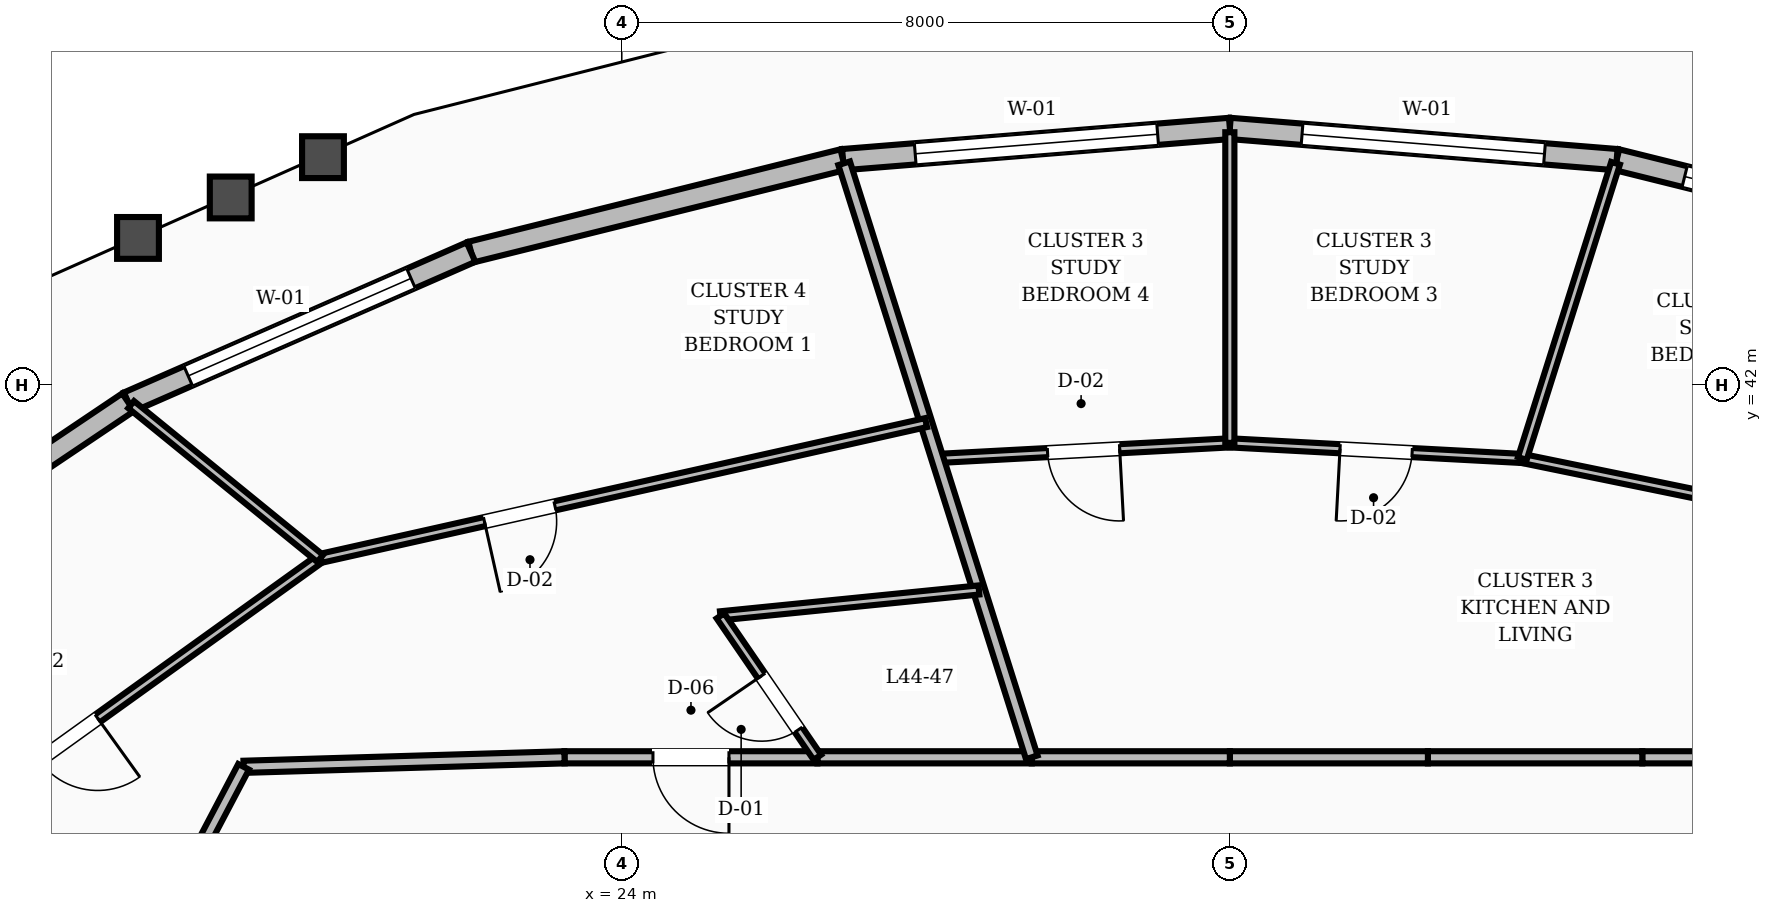
"""IFC4 building model, lengths in metres.
Left out: names, types, materials, properties, quantities, classifications, styles, units other than length and angle.
Written with IfcOpenShell. Run it as: python <this file> out.ifc"""

import sys

from ifc_helpers import new_model, si_unit, direction, frame, frame_2d, origin, place, context, subcontext, project, spatial, rectangle, extrude, element, fill, save


model = new_model("IFC4")
c1 = context("Model", 3, precision=1e-05, world=origin(), true_north=direction((0.0, 1.0)))
c2 = subcontext(c1, "Body", "Model", "MODEL_VIEW")
j1 = project(units=[si_unit("LENGTHUNIT", "METRE"), si_unit("PLANEANGLEUNIT", "RADIAN")], contexts=[c1])
p1 = place(None, origin())
s1 = spatial("IfcSite", under=j1, at=p1, CompositionType="ELEMENT")
p2 = place(p1, origin())
s2 = spatial("IfcBuilding", under=s1, at=p2, CompositionType="ELEMENT")
p3 = place(p2, frame((0.0, 0.0, 171.2)))
s3 = spatial("IfcBuildingStorey", under=s2, at=p3, CompositionType="ELEMENT", Elevation=171.2)
p4 = place(p3, frame((41.983, 43.747, 0.0), z_axis=(0.0, 0.0, 1.0), x_axis=(-0.970474792374, 0.241202565009, 0.0)))
e1 = element("IfcWall", 1, at=p4, inside=s3, PredefinedType="STANDARD", context=c2, shape_type="SweptSolid", body=[
    extrude(rectangle(XDim=5.043, YDim=0.28, at=frame_2d((2.521, 0.0))), origin(), (0.0, 0.0, 1.0), 2.82),
])
p5 = place(p4, frame((0.921, 0.0, 0.8)))
e2 = element("IfcOpeningElement", 2, at=p5, cuts=e1, PredefinedType="OPENING", context=c2, shape_type="SweptSolid", body=[
    extrude(rectangle(XDim=3.2, YDim=1.65, at=frame_2d((1.6, 0.825))), frame((0.0, 0.15, 0.0), z_axis=(0.0, -1.0, 0.0), x_axis=(1.0, 0.0, 0.0)), (0.0, 0.0, 1.0), 0.3),
])
p6 = place(p3, frame((37.09, 44.963, 0.0), z_axis=(0.0, 0.0, 1.0), x_axis=(-0.996760926591, 0.080421733512, 0.0)))
e3 = element("IfcWall", 3, at=p6, inside=s3, PredefinedType="STANDARD", context=c2, shape_type="SweptSolid", body=[
    extrude(rectangle(XDim=5.106, YDim=0.28, at=frame_2d((2.553, 0.0))), origin(), (0.0, 0.0, 1.0), 2.82),
])
p7 = place(p6, frame((0.953, 0.0, 0.8)))
e4 = element("IfcOpeningElement", 4, at=p7, cuts=e3, PredefinedType="OPENING", context=c2, shape_type="SweptSolid", body=[
    extrude(rectangle(XDim=3.2, YDim=1.65, at=frame_2d((1.6, 0.825))), frame((0.0, 0.15, 0.0), z_axis=(0.0, -1.0, 0.0), x_axis=(1.0, 0.0, 0.0)), (0.0, 0.0, 1.0), 0.3),
])
p8 = place(p3, frame((32.0, 45.374, 0.0), z_axis=(0.0, 0.0, 1.0), x_axis=(-0.996760926591, -0.080421733512, 0.0)))
e5 = element("IfcWall", 5, at=p8, inside=s3, PredefinedType="STANDARD", context=c2, shape_type="SweptSolid", body=[
    extrude(rectangle(XDim=5.106, YDim=0.28, at=frame_2d((2.553, 0.0))), origin(), (0.0, 0.0, 1.0), 2.82),
])
p9 = place(p8, frame((0.953, 0.0, 0.8)))
e6 = element("IfcOpeningElement", 6, at=p9, cuts=e5, PredefinedType="OPENING", context=c2, shape_type="SweptSolid", body=[
    extrude(rectangle(XDim=3.2, YDim=1.65, at=frame_2d((1.6, 0.825))), frame((0.0, 0.15, 0.0), z_axis=(0.0, -1.0, 0.0), x_axis=(1.0, 0.0, 0.0)), (0.0, 0.0, 1.0), 0.3),
])
p10 = place(p3, frame((26.91, 44.963, 0.0), z_axis=(0.0, 0.0, 1.0), x_axis=(-0.970474792374, -0.241202565009, 0.0)))
e7 = element("IfcWall", 7, at=p10, inside=s3, PredefinedType="STANDARD", context=c2, shape_type="SweptSolid", body=[
    extrude(rectangle(XDim=5.043, YDim=0.28, at=frame_2d((2.521, 0.0))), origin(), (0.0, 0.0, 1.0), 2.82),
])
p11 = place(p3, frame((22.017, 43.747, 0.0), z_axis=(0.0, 0.0, 1.0), x_axis=(-0.916018444192, -0.401136148832, 0.0)))
e8 = element("IfcWall", 8, at=p11, inside=s3, PredefinedType="STANDARD", context=c2, shape_type="SweptSolid", body=[
    extrude(rectangle(XDim=4.924, YDim=0.28, at=frame_2d((2.462, 0.0))), origin(), (0.0, 0.0, 1.0), 2.82),
])
p12 = place(p11, frame((0.862, 0.0, 0.8)))
e9 = element("IfcOpeningElement", 9, at=p12, cuts=e8, PredefinedType="OPENING", context=c2, shape_type="SweptSolid", body=[
    extrude(rectangle(XDim=3.2, YDim=1.65, at=frame_2d((1.6, 0.825))), frame((0.0, 0.15, 0.0), z_axis=(0.0, -1.0, 0.0), x_axis=(1.0, 0.0, 0.0)), (0.0, 0.0, 1.0), 0.3),
])
p13 = place(p3, frame((17.506, 41.771, 0.0), z_axis=(0.0, 0.0, 1.0), x_axis=(-0.82985197946, -0.557983594909, 0.0)))
e10 = element("IfcWall", 10, at=p13, inside=s3, PredefinedType="STANDARD", context=c2, shape_type="SweptSolid", body=[
    extrude(rectangle(XDim=4.764, YDim=0.28, at=frame_2d((2.382, 0.0))), origin(), (0.0, 0.0, 1.0), 2.82),
])
p14 = place(p3, frame((40.753, 37.1, 0.0), z_axis=(0.0, 0.0, 1.0), x_axis=(-1.0, 0.0, 0.0)))
e11 = element("IfcWall", 11, at=p14, inside=s3, PredefinedType="SOLIDWALL", context=c2, shape_type="SweptSolid", body=[
    extrude(rectangle(XDim=3.327, YDim=0.16, at=frame_2d((1.664, 0.0))), origin(), (0.0, 0.0, 1.0), 2.8),
])
p15 = place(p3, frame((37.426, 37.1, 0.0), z_axis=(0.0, 0.0, 1.0), x_axis=(-1.0, 0.0, 0.0)))
e12 = element("IfcWall", 12, at=p15, inside=s3, PredefinedType="SOLIDWALL", context=c2, shape_type="SweptSolid", body=[
    extrude(rectangle(XDim=2.821, YDim=0.16, at=frame_2d((1.41, 0.0))), origin(), (0.0, 0.0, 1.0), 2.8),
])
for number, where, z_axis, x_axis in (
    (13, (34.606, 37.1, 0.0), (0.0, 0.0, 1.0), (-1.0, 0.0, 0.0)),
    (14, (32.0, 37.1, 0.0), (0.0, 0.0, 1.0), (-1.0, 0.0, 0.0)),
):
    element("IfcWall", number, at=place(p3, frame(where, z_axis=z_axis, x_axis=x_axis)), inside=s3, PredefinedType="SOLIDWALL", context=c2, shape_type="SweptSolid", body=[
        extrude(rectangle(XDim=2.606, YDim=0.16, at=frame_2d((1.303, 0.0))), origin(), (0.0, 0.0, 1.0), 2.8),
    ])
p16 = place(p3, frame((29.394, 37.1, 0.0), z_axis=(0.0, 0.0, 1.0), x_axis=(-1.0, 0.0, 0.0)))
e15 = element("IfcWall", 15, at=p16, inside=s3, PredefinedType="SOLIDWALL", context=c2, shape_type="SweptSolid", body=[
    extrude(rectangle(XDim=2.821, YDim=0.16, at=frame_2d((1.41, 0.0))), origin(), (0.0, 0.0, 1.0), 2.8),
])
p17 = place(p3, frame((26.574, 37.1, 0.0), z_axis=(0.0, 0.0, 1.0), x_axis=(-1.0, 0.0, 0.0)))
e16 = element("IfcWall", 16, at=p17, inside=s3, PredefinedType="SOLIDWALL", context=c2, shape_type="SweptSolid", body=[
    extrude(rectangle(XDim=3.327, YDim=0.16, at=frame_2d((1.664, 0.0))), origin(), (0.0, 0.0, 1.0), 2.8),
])
p18 = place(p17, frame((1.164, 0.0, 0.0)))
e17 = element("IfcOpeningElement", 17, at=p18, cuts=e16, PredefinedType="OPENING", context=c2, shape_type="SweptSolid", body=[
    extrude(rectangle(XDim=1.0, YDim=2.1, at=frame_2d((0.5, 1.05))), frame((0.0, 0.09, 0.0), z_axis=(0.0, -1.0, 0.0), x_axis=(1.0, 0.0, 0.0)), (0.0, 0.0, 1.0), 0.18),
])
p19 = place(p3, frame((23.247, 37.1, 0.0), z_axis=(0.0, 0.0, 1.0), x_axis=(-0.999561990195, -0.029594387265, 0.0)))
e18 = element("IfcWall", 18, at=p19, inside=s3, PredefinedType="SOLIDWALL", context=c2, shape_type="SweptSolid", body=[
    extrude(rectangle(XDim=4.224, YDim=0.16, at=frame_2d((2.112, 0.0))), origin(), (0.0, 0.0, 1.0), 2.8),
])
p20 = place(p3, frame((19.025, 36.975, 0.0), z_axis=(0.0, 0.0, 1.0), x_axis=(-0.46527115782, -0.885168204185, 0.0)))
e19 = element("IfcWall", 19, at=p20, inside=s3, PredefinedType="SOLIDWALL", context=c2, shape_type="SweptSolid", body=[
    extrude(rectangle(XDim=3.6, YDim=0.16, at=frame_2d((1.8, 0.0))), origin(), (0.0, 0.0, 1.0), 2.8),
])
p21 = place(p3, frame((43.623, 39.436, 0.0), z_axis=(0.0, 0.0, 1.0), x_axis=(-0.979585309952, 0.201028904702, 0.0)))
e20 = element("IfcWall", 20, at=p21, inside=s3, PredefinedType="PARTITIONING", context=c2, shape_type="SweptSolid", body=[
    extrude(rectangle(XDim=7.938, YDim=0.12, at=frame_2d((3.969, 0.0))), origin(), (0.0, 0.0, 1.0), 2.8),
])
p22 = place(p21, frame((3.494, 0.0, 0.0)))
e21 = element("IfcOpeningElement", 21, at=p22, cuts=e20, PredefinedType="OPENING", context=c2, shape_type="SweptSolid", body=[
    extrude(rectangle(XDim=0.95, YDim=2.1, at=frame_2d((0.475, 1.05))), frame((0.0, 0.07, 0.0), z_axis=(0.0, -1.0, 0.0), x_axis=(1.0, 0.0, 0.0)), (0.0, 0.0, 1.0), 0.14),
])
p23 = place(p3, frame((35.848, 41.031, 0.0), z_axis=(0.0, 0.0, 1.0), x_axis=(-0.998579231715, 0.053287127784, 0.0)))
e22 = element("IfcWall", 22, at=p23, inside=s3, PredefinedType="PARTITIONING", context=c2, shape_type="SweptSolid", body=[
    extrude(rectangle(XDim=3.853, YDim=0.12, at=frame_2d((1.927, 0.0))), origin(), (0.0, 0.0, 1.0), 2.8),
])
p24 = place(p23, frame((1.452, 0.0, 0.0)))
e23 = element("IfcOpeningElement", 23, at=p24, cuts=e22, PredefinedType="OPENING", context=c2, shape_type="SweptSolid", body=[
    extrude(rectangle(XDim=0.95, YDim=2.1, at=frame_2d((0.475, 1.05))), frame((0.0, 0.07, 0.0), z_axis=(0.0, -1.0, 0.0), x_axis=(1.0, 0.0, 0.0)), (0.0, 0.0, 1.0), 0.14),
])
p25 = place(p3, frame((35.848, 41.031, 0.0), z_axis=(0.0, 0.0, 1.0), x_axis=(0.301226041054, 0.953552763192, 0.0)))
e24 = element("IfcWall", 24, at=p25, inside=s3, PredefinedType="PARTITIONING", context=c2, shape_type="SweptSolid", body=[
    extrude(rectangle(XDim=4.073, YDim=0.12, at=frame_2d((2.036, 0.0))), origin(), (0.0, 0.0, 1.0), 2.8),
])
p26 = place(p3, frame((32.0, 41.237, 0.0), z_axis=(0.0, 0.0, 1.0), x_axis=(-0.998579231715, -0.053287127784, 0.0)))
e25 = element("IfcWall", 25, at=p26, inside=s3, PredefinedType="PARTITIONING", context=c2, shape_type="SweptSolid", body=[
    extrude(rectangle(XDim=3.853, YDim=0.12, at=frame_2d((1.927, 0.0))), origin(), (0.0, 0.0, 1.0), 2.8),
])
p27 = place(p26, frame((1.452, 0.0, 0.0)))
e26 = element("IfcOpeningElement", 26, at=p27, cuts=e25, PredefinedType="OPENING", context=c2, shape_type="SweptSolid", body=[
    extrude(rectangle(XDim=0.95, YDim=2.1, at=frame_2d((0.475, 1.05))), frame((0.0, 0.07, 0.0), z_axis=(0.0, -1.0, 0.0), x_axis=(1.0, 0.0, 0.0)), (0.0, 0.0, 1.0), 0.14),
])
p28 = place(p3, frame((32.0, 41.237, 0.0), z_axis=(0.0, 0.0, 1.0), x_axis=(0.0, 1.0, 0.0)))
e27 = element("IfcWall", 27, at=p28, inside=s3, PredefinedType="PARTITIONING", context=c2, shape_type="SweptSolid", body=[
    extrude(rectangle(XDim=4.087, YDim=0.12, at=frame_2d((2.043, 0.0))), origin(), (0.0, 0.0, 1.0), 2.8),
])
p29 = place(p3, frame((29.394, 37.1, 0.0), z_axis=(0.0, 0.0, 1.0), x_axis=(-0.301228312568, 0.953552045621, 0.0)))
e28 = element("IfcWall", 28, at=p29, inside=s3, PredefinedType="SOLIDWALL", context=c2, shape_type="SweptSolid", body=[
    extrude(rectangle(XDim=8.196, YDim=0.16, at=frame_2d((4.098, 0.0))), origin(), (0.0, 0.0, 1.0), 2.8),
])
p30 = place(p3, frame((28.699, 39.302, 0.0), z_axis=(0.0, 0.0, 1.0), x_axis=(-0.995023035558, -0.099645164006, 0.0)))
e29 = element("IfcWall", 29, at=p30, inside=s3, PredefinedType="PARTITIONING", context=c2, shape_type="SweptSolid", body=[
    extrude(rectangle(XDim=3.418, YDim=0.12, at=frame_2d((1.709, 0.0))), origin(), (0.0, 0.0, 1.0), 2.8),
])
p31 = place(p3, frame((26.574, 37.1, 0.0), z_axis=(0.0, 0.0, 1.0), x_axis=(-0.565490503486, 0.824754806271, 0.0)))
e30 = element("IfcWall", 30, at=p31, inside=s3, PredefinedType="PARTITIONING", context=c2, shape_type="SweptSolid", body=[
    extrude(rectangle(XDim=2.256, YDim=0.12, at=frame_2d((1.128, 0.0))), origin(), (0.0, 0.0, 1.0), 2.8),
])
p32 = place(p31, frame((0.44, 0.0, 0.0)))
e31 = element("IfcOpeningElement", 31, at=p32, cuts=e30, PredefinedType="OPENING", context=c2, shape_type="SweptSolid", body=[
    extrude(rectangle(XDim=0.86, YDim=2.1, at=frame_2d((0.43, 1.05))), frame((0.0, 0.07, 0.0), z_axis=(0.0, -1.0, 0.0), x_axis=(1.0, 0.0, 0.0)), (0.0, 0.0, 1.0), 0.14),
])
p33 = place(p3, frame((28.003, 41.503, 0.0), z_axis=(0.0, 0.0, 1.0), x_axis=(-0.975777479016, -0.218765425617, 0.0)))
e32 = element("IfcWall", 32, at=p33, inside=s3, PredefinedType="PARTITIONING", context=c2, shape_type="SweptSolid", body=[
    extrude(rectangle(XDim=8.169, YDim=0.12, at=frame_2d((4.084, 0.0))), origin(), (0.0, 0.0, 1.0), 2.8),
])
p34 = place(p33, frame((5.004, 0.0, 0.0)))
e33 = element("IfcOpeningElement", 33, at=p34, cuts=e32, PredefinedType="OPENING", context=c2, shape_type="SweptSolid", body=[
    extrude(rectangle(XDim=0.95, YDim=2.1, at=frame_2d((0.475, 1.05))), frame((0.0, 0.07, 0.0), z_axis=(0.0, -1.0, 0.0), x_axis=(1.0, 0.0, 0.0)), (0.0, 0.0, 1.0), 0.14),
])
p35 = place(p3, frame((20.032, 39.716, 0.0), z_axis=(0.0, 0.0, 1.0), x_axis=(-0.812167375512, -0.58342450596, 0.0)))
e34 = element("IfcWall", 34, at=p35, inside=s3, PredefinedType="PARTITIONING", context=c2, shape_type="SweptSolid", body=[
    extrude(rectangle(XDim=8.157, YDim=0.12, at=frame_2d((4.079, 0.0))), origin(), (0.0, 0.0, 1.0), 2.8),
])
p36 = place(p35, frame((3.604, 0.0, 0.0)))
e35 = element("IfcOpeningElement", 35, at=p36, cuts=e34, PredefinedType="OPENING", context=c2, shape_type="SweptSolid", body=[
    extrude(rectangle(XDim=0.95, YDim=2.1, at=frame_2d((0.475, 1.05))), frame((0.0, 0.07, 0.0), z_axis=(0.0, -1.0, 0.0), x_axis=(1.0, 0.0, 0.0)), (0.0, 0.0, 1.0), 0.14),
])
p37 = place(p3, frame((20.032, 39.716, 0.0), z_axis=(0.0, 0.0, 1.0), x_axis=(-0.775664293068, 0.631145707788, 0.0)))
e36 = element("IfcWall", 36, at=p37, inside=s3, PredefinedType="PARTITIONING", context=c2, shape_type="SweptSolid", body=[
    extrude(rectangle(XDim=3.206, YDim=0.12, at=frame_2d((1.603, 0.0))), origin(), (0.0, 0.0, 1.0), 2.8),
])
p38 = place(p5, origin())
e37 = element("IfcWindow", 37, at=p38, inside=s3, PartitioningType="SINGLE_PANEL", PredefinedType="WINDOW", context=c2, shape_type="SweptSolid", body=[
    extrude(rectangle(XDim=3.2, YDim=1.65, at=frame_2d((1.6, 0.825))), frame((0.0, 0.03, 0.0), z_axis=(0.0, -1.0, 0.0), x_axis=(1.0, 0.0, 0.0)), (0.0, 0.0, 1.0), 0.06),
])
fill(e2, e37)
p39 = place(p7, origin())
e38 = element("IfcWindow", 38, at=p39, inside=s3, PartitioningType="SINGLE_PANEL", PredefinedType="WINDOW", context=c2, shape_type="SweptSolid", body=[
    extrude(rectangle(XDim=3.2, YDim=1.65, at=frame_2d((1.6, 0.825))), frame((0.0, 0.03, 0.0), z_axis=(0.0, -1.0, 0.0), x_axis=(1.0, 0.0, 0.0)), (0.0, 0.0, 1.0), 0.06),
])
fill(e4, e38)
p40 = place(p9, origin())
e39 = element("IfcWindow", 39, at=p40, inside=s3, PartitioningType="SINGLE_PANEL", PredefinedType="WINDOW", context=c2, shape_type="SweptSolid", body=[
    extrude(rectangle(XDim=3.2, YDim=1.65, at=frame_2d((1.6, 0.825))), frame((0.0, 0.03, 0.0), z_axis=(0.0, -1.0, 0.0), x_axis=(1.0, 0.0, 0.0)), (0.0, 0.0, 1.0), 0.06),
])
fill(e6, e39)
p41 = place(p12, origin())
e40 = element("IfcWindow", 40, at=p41, inside=s3, PartitioningType="SINGLE_PANEL", PredefinedType="WINDOW", context=c2, shape_type="SweptSolid", body=[
    extrude(rectangle(XDim=3.2, YDim=1.65, at=frame_2d((1.6, 0.825))), frame((0.0, 0.03, 0.0), z_axis=(0.0, -1.0, 0.0), x_axis=(1.0, 0.0, 0.0)), (0.0, 0.0, 1.0), 0.06),
])
fill(e9, e40)
p42 = place(p24, origin())
e41 = element("IfcDoor", 41, at=p42, inside=s3, OperationType="SINGLE_SWING_RIGHT", PredefinedType="DOOR", context=c2, shape_type="SweptSolid", body=[
    extrude(rectangle(XDim=0.95, YDim=2.1, at=frame_2d((0.475, 1.05))), frame((0.0, 0.025, 0.0), z_axis=(0.0, -1.0, 0.0), x_axis=(1.0, 0.0, 0.0)), (0.0, 0.0, 1.0), 0.05),
])
fill(e23, e41)
p43 = place(p27, origin())
e42 = element("IfcDoor", 42, at=p43, inside=s3, OperationType="SINGLE_SWING_LEFT", PredefinedType="DOOR", context=c2, shape_type="SweptSolid", body=[
    extrude(rectangle(XDim=0.95, YDim=2.1, at=frame_2d((0.475, 1.05))), frame((0.0, 0.025, 0.0), z_axis=(0.0, -1.0, 0.0), x_axis=(1.0, 0.0, 0.0)), (0.0, 0.0, 1.0), 0.05),
])
fill(e26, e42)
p44 = place(p32, origin())
e43 = element("IfcDoor", 43, at=p44, inside=s3, OperationType="SINGLE_SWING_RIGHT", PredefinedType="DOOR", context=c2, shape_type="SweptSolid", body=[
    extrude(rectangle(XDim=0.86, YDim=2.1, at=frame_2d((0.43, 1.05))), frame((0.0, 0.025, 0.0), z_axis=(0.0, -1.0, 0.0), x_axis=(1.0, 0.0, 0.0)), (0.0, 0.0, 1.0), 0.05),
])
fill(e31, e43)
p45 = place(p18, origin())
e44 = element("IfcDoor", 44, at=p45, inside=s3, OperationType="SINGLE_SWING_LEFT", PredefinedType="DOOR", context=c2, shape_type="SweptSolid", body=[
    extrude(rectangle(XDim=1.0, YDim=2.1, at=frame_2d((0.5, 1.05))), frame((0.0, 0.025, 0.0), z_axis=(0.0, -1.0, 0.0), x_axis=(1.0, 0.0, 0.0)), (0.0, 0.0, 1.0), 0.05),
])
fill(e17, e44)
p46 = place(p34, origin())
e45 = element("IfcDoor", 45, at=p46, inside=s3, OperationType="SINGLE_SWING_RIGHT", PredefinedType="DOOR", context=c2, shape_type="SweptSolid", body=[
    extrude(rectangle(XDim=0.95, YDim=2.1, at=frame_2d((0.475, 1.05))), frame((0.0, 0.025, 0.0), z_axis=(0.0, -1.0, 0.0), x_axis=(1.0, 0.0, 0.0)), (0.0, 0.0, 1.0), 0.05),
])
fill(e33, e45)
p47 = place(p36, origin())
e46 = element("IfcDoor", 46, at=p47, inside=s3, OperationType="SINGLE_SWING_LEFT", PredefinedType="DOOR", context=c2, shape_type="SweptSolid", body=[
    extrude(rectangle(XDim=0.95, YDim=2.1, at=frame_2d((0.475, 1.05))), frame((0.0, 0.025, 0.0), z_axis=(0.0, -1.0, 0.0), x_axis=(1.0, 0.0, 0.0)), (0.0, 0.0, 1.0), 0.05),
])
fill(e35, e46)
save(model, sys.argv[1])
